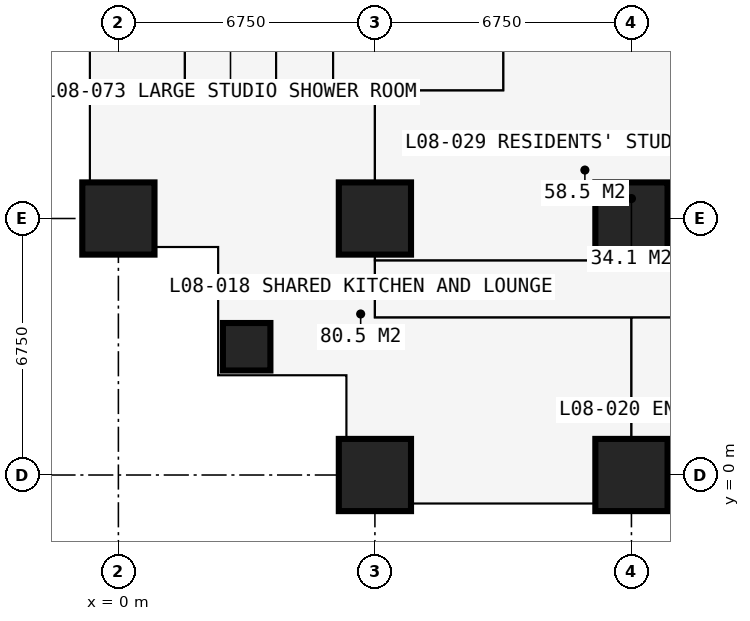
"""IFC4 building model, lengths in metres.
Left out: names, types, materials, properties, quantities, classifications, styles, units other than length and angle.
Written with IfcOpenShell. Run it as: python <this file> out.ifc"""

import sys

from ifc_helpers import new_model, si_unit, direction, frame, frame_2d, origin, origin_2d, place, context, subcontext, project, spatial, rectangle, extrude, element, fill, save


model = new_model("IFC4")
c1 = context("Model", 3, precision=1e-05, world=origin(), true_north=direction((0.0, 1.0)))
c2 = subcontext(c1, "Body", "Model", "MODEL_VIEW")
j1 = project(units=[si_unit("LENGTHUNIT", "METRE"), si_unit("PLANEANGLEUNIT", "RADIAN")], contexts=[c1])
p1 = place(None, origin())
s1 = spatial("IfcSite", under=j1, at=p1, CompositionType="ELEMENT")
p2 = place(p1, origin())
s2 = spatial("IfcBuilding", under=s1, at=p2, CompositionType="ELEMENT")
p3 = place(p2, frame((0.0, 0.0, 32.4)))
s3 = spatial("IfcBuildingStorey", under=s2, at=p3, CompositionType="ELEMENT", Elevation=32.4)
p4 = place(p3, frame((0.0, 6.75, 0.0), z_axis=(0.0, 0.0, 1.0), x_axis=(1.0, 0.0, 0.0)))
e1 = element("IfcColumn", 1, at=p4, inside=s3, PredefinedType="COLUMN", context=c2, shape_type="SweptSolid", body=[
    extrude(rectangle(XDim=1.9, YDim=1.9, at=origin_2d()), origin(), (0.0, 0.0, 1.0), 3.6),
])
p5 = place(p3, frame((3.375, 3.375, 0.0), z_axis=(0.0, 0.0, 1.0), x_axis=(1.0, 0.0, 0.0)))
e2 = element("IfcColumn", 2, at=p5, inside=s3, PredefinedType="COLUMN", context=c2, shape_type="SweptSolid", body=[
    extrude(rectangle(XDim=1.25, YDim=1.25, at=origin_2d()), origin(), (0.0, 0.0, 1.0), 3.6),
])
for number, where, z_axis, x_axis in (
    (3, (6.75, 0.0, 0.0), (0.0, 0.0, 1.0), (1.0, 0.0, 0.0)),
    (4, (6.75, 6.75, 0.0), (0.0, 0.0, 1.0), (1.0, 0.0, 0.0)),
    (5, (13.5, 0.0, 0.0), (0.0, 0.0, 1.0), (1.0, 0.0, 0.0)),
    (6, (13.5, 6.75, 0.0), (0.0, 0.0, 1.0), (1.0, 0.0, 0.0)),
):
    element("IfcColumn", number, at=place(p3, frame(where, z_axis=z_axis, x_axis=x_axis)), inside=s3, PredefinedType="COLUMN", context=c2, shape_type="SweptSolid", body=[
        extrude(rectangle(XDim=1.9, YDim=1.9, at=origin_2d()), origin(), (0.0, 0.0, 1.0), 3.6),
    ])
p6 = place(p3, frame((-0.75, 6.0, 0.0), z_axis=(0.0, 0.0, 1.0), x_axis=(1.0, 0.0, 0.0)))
e7 = element("IfcWall", 7, at=p6, inside=s3, PredefinedType="SOLIDWALL", context=c2, shape_type="SweptSolid", body=[
    extrude(rectangle(XDim=3.375, YDim=0.3, at=frame_2d((1.688, 0.0))), origin(), (0.0, 0.0, 1.0), 3.375),
])
p7 = place(p6, frame((1.857, 0.0, 0.9)))
e8 = element("IfcOpeningElement", 8, at=p7, cuts=e7, PredefinedType="OPENING", context=c2, shape_type="SweptSolid", body=[
    extrude(rectangle(XDim=1.2, YDim=1.8, at=frame_2d((0.6, 0.9))), frame((0.0, 0.16, 0.0), z_axis=(0.0, -1.0, 0.0), x_axis=(1.0, 0.0, 0.0)), (0.0, 0.0, 1.0), 0.32),
])
p8 = place(p3, frame((2.625, 6.0, 0.0), z_axis=(0.0, 0.0, 1.0), x_axis=(0.0, -1.0, 0.0)))
e9 = element("IfcWall", 9, at=p8, inside=s3, PredefinedType="SOLIDWALL", context=c2, shape_type="SweptSolid", body=[
    extrude(rectangle(XDim=3.375, YDim=0.3, at=frame_2d((1.688, 0.0))), origin(), (0.0, 0.0, 1.0), 3.375),
])
p9 = place(p8, frame((0.788, 0.0, 0.6)))
e10 = element("IfcOpeningElement", 10, at=p9, cuts=e9, PredefinedType="OPENING", context=c2, shape_type="SweptSolid", body=[
    extrude(rectangle(XDim=1.8, YDim=2.1, at=frame_2d((0.9, 1.05))), frame((0.0, 0.16, 0.0), z_axis=(0.0, -1.0, 0.0), x_axis=(1.0, 0.0, 0.0)), (0.0, 0.0, 1.0), 0.32),
])
p10 = place(p3, frame((2.625, 2.625, 0.0), z_axis=(0.0, 0.0, 1.0), x_axis=(1.0, 0.0, 0.0)))
e11 = element("IfcWall", 11, at=p10, inside=s3, PredefinedType="SOLIDWALL", context=c2, shape_type="SweptSolid", body=[
    extrude(rectangle(XDim=3.375, YDim=0.3, at=frame_2d((1.688, 0.0))), origin(), (0.0, 0.0, 1.0), 3.375),
])
p11 = place(p10, frame((0.788, 0.0, 0.6)))
e12 = element("IfcOpeningElement", 12, at=p11, cuts=e11, PredefinedType="OPENING", context=c2, shape_type="SweptSolid", body=[
    extrude(rectangle(XDim=1.8, YDim=2.1, at=frame_2d((0.9, 1.05))), frame((0.0, 0.16, 0.0), z_axis=(0.0, -1.0, 0.0), x_axis=(1.0, 0.0, 0.0)), (0.0, 0.0, 1.0), 0.32),
])
p12 = place(p3, frame((6.0, 2.625, 0.0), z_axis=(0.0, 0.0, 1.0), x_axis=(0.0, -1.0, 0.0)))
e13 = element("IfcWall", 13, at=p12, inside=s3, PredefinedType="SOLIDWALL", context=c2, shape_type="SweptSolid", body=[
    extrude(rectangle(XDim=3.375, YDim=0.3, at=frame_2d((1.688, 0.0))), origin(), (0.0, 0.0, 1.0), 3.375),
])
p13 = place(p12, frame((0.317, 0.0, 0.9)))
e14 = element("IfcOpeningElement", 14, at=p13, cuts=e13, PredefinedType="OPENING", context=c2, shape_type="SweptSolid", body=[
    extrude(rectangle(XDim=1.2, YDim=1.8, at=frame_2d((0.6, 0.9))), frame((0.0, 0.16, 0.0), z_axis=(0.0, -1.0, 0.0), x_axis=(1.0, 0.0, 0.0)), (0.0, 0.0, 1.0), 0.32),
])
p14 = place(p3, frame((20.25, -0.75, 0.0), z_axis=(0.0, 0.0, 1.0), x_axis=(-1.0, 0.0, 0.0)))
e15 = element("IfcWall", 15, at=p14, inside=s3, PredefinedType="SOLIDWALL", context=c2, shape_type="SweptSolid", body=[
    extrude(rectangle(XDim=6.75, YDim=0.15, at=frame_2d((3.375, 0.0))), origin(), (0.0, 0.0, 1.0), 3.375),
])
p15 = place(p14, frame((0.996, 0.0, 0.0)))
e16 = element("IfcOpeningElement", 16, at=p15, cuts=e15, PredefinedType="OPENING", context=c2, shape_type="SweptSolid", body=[
    extrude(rectangle(XDim=1.0, YDim=2.2, at=frame_2d((0.5, 1.1))), frame((0.0, 0.085, 0.0), z_axis=(0.0, -1.0, 0.0), x_axis=(1.0, 0.0, 0.0)), (0.0, 0.0, 1.0), 0.17),
])
p16 = place(p14, frame((2.042, 0.0, 0.9)))
e17 = element("IfcOpeningElement", 17, at=p16, cuts=e15, PredefinedType="OPENING", context=c2, shape_type="SweptSolid", body=[
    extrude(rectangle(XDim=1.2, YDim=1.8, at=frame_2d((0.6, 0.9))), frame((0.0, 0.085, 0.0), z_axis=(0.0, -1.0, 0.0), x_axis=(1.0, 0.0, 0.0)), (0.0, 0.0, 1.0), 0.17),
])
p17 = place(p14, frame((4.754, 0.0, 0.0)))
e18 = element("IfcOpeningElement", 18, at=p17, cuts=e15, PredefinedType="OPENING", context=c2, shape_type="SweptSolid", body=[
    extrude(rectangle(XDim=1.0, YDim=2.2, at=frame_2d((0.5, 1.1))), frame((0.0, 0.085, 0.0), z_axis=(0.0, -1.0, 0.0), x_axis=(1.0, 0.0, 0.0)), (0.0, 0.0, 1.0), 0.17),
])
p18 = place(p14, frame((3.508, 0.0, 0.9)))
e19 = element("IfcOpeningElement", 19, at=p18, cuts=e15, PredefinedType="OPENING", context=c2, shape_type="SweptSolid", body=[
    extrude(rectangle(XDim=1.2, YDim=1.8, at=frame_2d((0.6, 0.9))), frame((0.0, 0.085, 0.0), z_axis=(0.0, -1.0, 0.0), x_axis=(1.0, 0.0, 0.0)), (0.0, 0.0, 1.0), 0.17),
])
p19 = place(p3, frame((-0.734, 10.125, 0.0), z_axis=(0.0, 0.0, 1.0), x_axis=(1.0, 0.0, 0.0)))
e20 = element("IfcWall", 20, at=p19, inside=s3, PredefinedType="PARTITIONING", context=c2, shape_type="SweptSolid", body=[
    extrude(rectangle(XDim=10.859, YDim=0.15, at=frame_2d((5.429, 0.0))), origin(), (0.0, 0.0, 1.0), 3.375),
])
p20 = place(p3, frame((1.75, 10.125, 0.0), z_axis=(0.0, 0.0, 1.0), x_axis=(0.0, 1.0, 0.0)))
e21 = element("IfcWall", 21, at=p20, inside=s3, PredefinedType="PARTITIONING", context=c2, shape_type="SweptSolid", body=[
    extrude(rectangle(XDim=2.6, YDim=0.1, at=frame_2d((1.3, 0.0))), origin(), (0.0, 0.0, 1.0), 3.375),
])
p21 = place(p20, frame((0.85, 0.0, 0.0)))
e22 = element("IfcOpeningElement", 22, at=p21, cuts=e21, PredefinedType="OPENING", context=c2, shape_type="SweptSolid", body=[
    extrude(rectangle(XDim=0.9, YDim=2.2, at=frame_2d((0.45, 1.1))), frame((0.0, 0.06, 0.0), z_axis=(0.0, -1.0, 0.0), x_axis=(1.0, 0.0, 0.0)), (0.0, 0.0, 1.0), 0.12),
])
p22 = place(p3, frame((4.15, 10.125, 0.0), z_axis=(0.0, 0.0, 1.0), x_axis=(0.0, 1.0, 0.0)))
e23 = element("IfcWall", 23, at=p22, inside=s3, PredefinedType="PARTITIONING", context=c2, shape_type="SweptSolid", body=[
    extrude(rectangle(XDim=23.625, YDim=0.15, at=frame_2d((11.812, 0.0))), origin(), (0.0, 0.0, 1.0), 3.375),
])
p23 = place(p22, frame((19.775, 0.0, 0.0)))
e24 = element("IfcOpeningElement", 24, at=p23, cuts=e23, PredefinedType="OPENING", context=c2, shape_type="SweptSolid", body=[
    extrude(rectangle(XDim=1.0, YDim=2.2, at=frame_2d((0.5, 1.1))), frame((0.0, 0.085, 0.0), z_axis=(0.0, -1.0, 0.0), x_axis=(1.0, 0.0, 0.0)), (0.0, 0.0, 1.0), 0.17),
])
p24 = place(p22, frame((13.7, 0.0, 0.0)))
e25 = element("IfcOpeningElement", 25, at=p24, cuts=e23, PredefinedType="OPENING", context=c2, shape_type="SweptSolid", body=[
    extrude(rectangle(XDim=0.95, YDim=2.2, at=frame_2d((0.475, 1.1))), frame((0.0, 0.085, 0.0), z_axis=(0.0, -1.0, 0.0), x_axis=(1.0, 0.0, 0.0)), (0.0, 0.0, 1.0), 0.17),
])
p25 = place(p22, frame((4.2, 0.0, 0.0)))
e26 = element("IfcOpeningElement", 26, at=p25, cuts=e23, PredefinedType="OPENING", context=c2, shape_type="SweptSolid", body=[
    extrude(rectangle(XDim=0.95, YDim=2.2, at=frame_2d((0.475, 1.1))), frame((0.0, 0.085, 0.0), z_axis=(0.0, -1.0, 0.0), x_axis=(1.0, 0.0, 0.0)), (0.0, 0.0, 1.0), 0.17),
])
p26 = place(p22, frame((10.95, 0.0, 0.0)))
e27 = element("IfcOpeningElement", 27, at=p26, cuts=e23, PredefinedType="OPENING", context=c2, shape_type="SweptSolid", body=[
    extrude(rectangle(XDim=0.95, YDim=2.2, at=frame_2d((0.475, 1.1))), frame((0.0, 0.085, 0.0), z_axis=(0.0, -1.0, 0.0), x_axis=(1.0, 0.0, 0.0)), (0.0, 0.0, 1.0), 0.17),
])
p27 = place(p3, frame((5.65, 10.125, 0.0), z_axis=(0.0, 0.0, 1.0), x_axis=(0.0, 1.0, 0.0)))
e28 = element("IfcWall", 28, at=p27, inside=s3, PredefinedType="PARTITIONING", context=c2, shape_type="SweptSolid", body=[
    extrude(rectangle(XDim=10.762, YDim=0.15, at=frame_2d((5.381, 0.0))), origin(), (0.0, 0.0, 1.0), 3.375),
])
p28 = place(p27, frame((4.9, 0.0, 0.0)))
e29 = element("IfcOpeningElement", 29, at=p28, cuts=e28, PredefinedType="OPENING", context=c2, shape_type="SweptSolid", body=[
    extrude(rectangle(XDim=0.95, YDim=2.2, at=frame_2d((0.475, 1.1))), frame((0.0, 0.085, 0.0), z_axis=(0.0, -1.0, 0.0), x_axis=(1.0, 0.0, 0.0)), (0.0, 0.0, 1.0), 0.17),
])
p29 = place(p3, frame((6.75, 4.15, 0.0), z_axis=(0.0, 0.0, 1.0), x_axis=(0.0, 1.0, 0.0)))
e30 = element("IfcWall", 30, at=p29, inside=s3, PredefinedType="PARTITIONING", context=c2, shape_type="SweptSolid", body=[
    extrude(rectangle(XDim=5.975, YDim=0.15, at=frame_2d((2.988, 0.0))), origin(), (0.0, 0.0, 1.0), 2.877),
])
p30 = place(p3, frame((6.75, 4.15, 0.0), z_axis=(0.0, 0.0, 1.0), x_axis=(1.0, 0.0, 0.0)))
e31 = element("IfcWall", 31, at=p30, inside=s3, PredefinedType="PARTITIONING", context=c2, shape_type="SweptSolid", body=[
    extrude(rectangle(XDim=23.625, YDim=0.1, at=frame_2d((11.812, 0.0))), origin(), (0.0, 0.0, 1.0), 3.375),
])
p31 = place(p30, frame((2.85, 0.0, 0.0)))
e32 = element("IfcOpeningElement", 32, at=p31, cuts=e31, PredefinedType="OPENING", context=c2, shape_type="SweptSolid", body=[
    extrude(rectangle(XDim=1.0, YDim=2.2, at=frame_2d((0.5, 1.1))), frame((0.0, 0.06, 0.0), z_axis=(0.0, -1.0, 0.0), x_axis=(1.0, 0.0, 0.0)), (0.0, 0.0, 1.0), 0.12),
])
p32 = place(p30, frame((6.95, 0.0, 0.0)))
e33 = element("IfcOpeningElement", 33, at=p32, cuts=e31, PredefinedType="OPENING", context=c2, shape_type="SweptSolid", body=[
    extrude(rectangle(XDim=0.95, YDim=2.2, at=frame_2d((0.475, 1.1))), frame((0.0, 0.06, 0.0), z_axis=(0.0, -1.0, 0.0), x_axis=(1.0, 0.0, 0.0)), (0.0, 0.0, 1.0), 0.12),
])
p33 = place(p30, frame((10.375, 0.0, 0.0)))
e34 = element("IfcOpeningElement", 34, at=p33, cuts=e31, PredefinedType="OPENING", context=c2, shape_type="SweptSolid", body=[
    extrude(rectangle(XDim=0.95, YDim=2.2, at=frame_2d((0.475, 1.1))), frame((0.0, 0.06, 0.0), z_axis=(0.0, -1.0, 0.0), x_axis=(1.0, 0.0, 0.0)), (0.0, 0.0, 1.0), 0.12),
])
p34 = place(p30, frame((18.475, 0.0, 0.0)))
e35 = element("IfcOpeningElement", 35, at=p34, cuts=e31, PredefinedType="OPENING", context=c2, shape_type="SweptSolid", body=[
    extrude(rectangle(XDim=0.95, YDim=2.2, at=frame_2d((0.475, 1.1))), frame((0.0, 0.06, 0.0), z_axis=(0.0, -1.0, 0.0), x_axis=(1.0, 0.0, 0.0)), (0.0, 0.0, 1.0), 0.12),
])
p35 = place(p30, frame((13.7, 0.0, 0.0)))
e36 = element("IfcOpeningElement", 36, at=p35, cuts=e31, PredefinedType="OPENING", context=c2, shape_type="SweptSolid", body=[
    extrude(rectangle(XDim=0.95, YDim=2.2, at=frame_2d((0.475, 1.1))), frame((0.0, 0.06, 0.0), z_axis=(0.0, -1.0, 0.0), x_axis=(1.0, 0.0, 0.0)), (0.0, 0.0, 1.0), 0.12),
])
p36 = place(p3, frame((6.75, 5.65, 0.0), z_axis=(0.0, 0.0, 1.0), x_axis=(1.0, 0.0, 0.0)))
e37 = element("IfcWall", 37, at=p36, inside=s3, PredefinedType="PARTITIONING", context=c2, shape_type="SweptSolid", body=[
    extrude(rectangle(XDim=11.05, YDim=0.15, at=frame_2d((5.525, 0.0))), origin(), (0.0, 0.0, 1.0), 3.375),
])
p37 = place(p3, frame((10.125, 10.125, 0.0), z_axis=(0.0, 0.0, 1.0), x_axis=(0.0, 1.0, 0.0)))
e38 = element("IfcWall", 38, at=p37, inside=s3, PredefinedType="PARTITIONING", context=c2, shape_type="SweptSolid", body=[
    extrude(rectangle(XDim=1.175, YDim=0.15, at=frame_2d((0.587, 0.0))), origin(), (0.0, 0.0, 1.0), 3.375),
])
p38 = place(p3, frame((13.5, -0.734, 0.0), z_axis=(0.0, 0.0, 1.0), x_axis=(0.0, 1.0, 0.0)))
e39 = element("IfcWall", 39, at=p38, inside=s3, PredefinedType="PARTITIONING", context=c2, shape_type="SweptSolid", body=[
    extrude(rectangle(XDim=4.884, YDim=0.15, at=frame_2d((2.442, 0.0))), origin(), (0.0, 0.0, 1.0), 2.877),
])
p39 = place(p7, origin())
e40 = element("IfcWindow", 40, at=p39, inside=s3, PartitioningType="SINGLE_PANEL", PredefinedType="WINDOW", context=c2, shape_type="SweptSolid", body=[
    extrude(rectangle(XDim=1.2, YDim=1.8, at=frame_2d((0.6, 0.9))), frame((0.0, 0.03, 0.0), z_axis=(0.0, -1.0, 0.0), x_axis=(1.0, 0.0, 0.0)), (0.0, 0.0, 1.0), 0.06),
])
fill(e8, e40)
p40 = place(p9, origin())
e41 = element("IfcWindow", 41, at=p40, inside=s3, PartitioningType="SINGLE_PANEL", PredefinedType="WINDOW", context=c2, shape_type="SweptSolid", body=[
    extrude(rectangle(XDim=1.8, YDim=2.1, at=frame_2d((0.9, 1.05))), frame((0.0, 0.03, 0.0), z_axis=(0.0, -1.0, 0.0), x_axis=(1.0, 0.0, 0.0)), (0.0, 0.0, 1.0), 0.06),
])
fill(e10, e41)
p41 = place(p11, origin())
e42 = element("IfcWindow", 42, at=p41, inside=s3, PartitioningType="SINGLE_PANEL", PredefinedType="WINDOW", context=c2, shape_type="SweptSolid", body=[
    extrude(rectangle(XDim=1.8, YDim=2.1, at=frame_2d((0.9, 1.05))), frame((0.0, 0.03, 0.0), z_axis=(0.0, -1.0, 0.0), x_axis=(1.0, 0.0, 0.0)), (0.0, 0.0, 1.0), 0.06),
])
fill(e12, e42)
p42 = place(p13, origin())
e43 = element("IfcWindow", 43, at=p42, inside=s3, PartitioningType="SINGLE_PANEL", PredefinedType="WINDOW", context=c2, shape_type="SweptSolid", body=[
    extrude(rectangle(XDim=1.2, YDim=1.8, at=frame_2d((0.6, 0.9))), frame((0.0, 0.03, 0.0), z_axis=(0.0, -1.0, 0.0), x_axis=(1.0, 0.0, 0.0)), (0.0, 0.0, 1.0), 0.06),
])
fill(e14, e43)
p43 = place(p17, origin())
e44 = element("IfcDoor", 44, at=p43, inside=s3, OperationType="SINGLE_SWING_RIGHT", PredefinedType="DOOR", context=c2, shape_type="SweptSolid", body=[
    extrude(rectangle(XDim=1.0, YDim=2.2, at=frame_2d((0.5, 1.1))), frame((0.0, 0.025, 0.0), z_axis=(0.0, -1.0, 0.0), x_axis=(1.0, 0.0, 0.0)), (0.0, 0.0, 1.0), 0.05),
])
fill(e18, e44)
p44 = place(p31, origin())
e45 = element("IfcDoor", 45, at=p44, inside=s3, OperationType="SINGLE_SWING_LEFT", PredefinedType="DOOR", context=c2, shape_type="SweptSolid", body=[
    extrude(rectangle(XDim=1.0, YDim=2.2, at=frame_2d((0.5, 1.1))), frame((0.0, 0.025, 0.0), z_axis=(0.0, -1.0, 0.0), x_axis=(1.0, 0.0, 0.0)), (0.0, 0.0, 1.0), 0.05),
])
fill(e32, e45)
p45 = place(p32, origin())
e46 = element("IfcDoor", 46, at=p45, inside=s3, OperationType="SINGLE_SWING_LEFT", PredefinedType="DOOR", context=c2, shape_type="SweptSolid", body=[
    extrude(rectangle(XDim=0.95, YDim=2.2, at=frame_2d((0.475, 1.1))), frame((0.0, 0.025, 0.0), z_axis=(0.0, -1.0, 0.0), x_axis=(1.0, 0.0, 0.0)), (0.0, 0.0, 1.0), 0.05),
])
fill(e33, e46)
p46 = place(p21, origin())
e47 = element("IfcDoor", 47, at=p46, inside=s3, OperationType="SINGLE_SWING_RIGHT", PredefinedType="DOOR", context=c2, shape_type="SweptSolid", body=[
    extrude(rectangle(XDim=0.9, YDim=2.2, at=frame_2d((0.45, 1.1))), frame((0.0, 0.025, 0.0), z_axis=(0.0, -1.0, 0.0), x_axis=(1.0, 0.0, 0.0)), (0.0, 0.0, 1.0), 0.05),
])
fill(e22, e47)
save(model, sys.argv[1])
